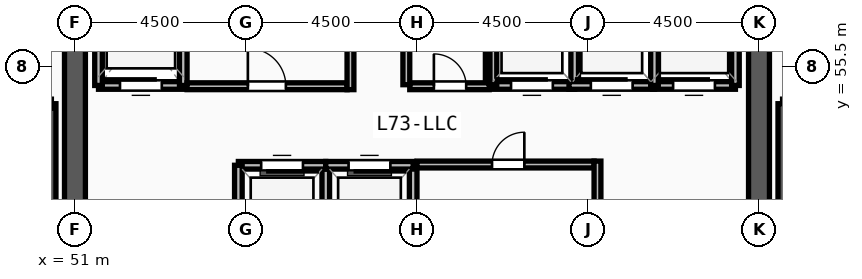
"""IFC4 building model, lengths in metres.
Left out: names, types, materials, properties, quantities, classifications, styles, units other than length and angle.
Written with IfcOpenShell. Run it as: python <this file> out.ifc"""

import sys

from ifc_helpers import new_model, si_unit, direction, frame, frame_2d, origin, place, context, subcontext, project, spatial, rectangle, extrude, source, transform, mapped, element, fill, save


model = new_model("IFC4")
c1 = context("Model", 3, precision=1e-05, world=origin(), true_north=direction((0.0, 1.0)))
c2 = subcontext(c1, "Body", "Model", "MODEL_VIEW")
j1 = project(units=[si_unit("LENGTHUNIT", "METRE"), si_unit("PLANEANGLEUNIT", "RADIAN")], contexts=[c1])
p1 = place(None, origin())
s1 = spatial("IfcSite", under=j1, at=p1, CompositionType="ELEMENT")
p2 = place(p1, origin())
s2 = spatial("IfcBuilding", under=s1, at=p2, CompositionType="ELEMENT")
p3 = place(p2, frame((0.0, 0.0, 282.0)))
s3 = spatial("IfcBuildingStorey", under=s2, at=p3, CompositionType="ELEMENT", Elevation=282.0)
p4 = place(p3, frame((69.0, 60.9, 0.0), z_axis=(0.0, 0.0, 1.0), x_axis=(0.0, -1.0, 0.0)))
e1 = element("IfcWall", 1, at=p4, inside=s3, PredefinedType="SHEAR", context=c2, shape_type="SweptSolid", body=[
    extrude(rectangle(XDim=13.8, YDim=0.55, at=frame_2d((6.9, 0.0))), origin(), (0.0, 0.0, 1.0), 4.32),
])
m1 = source(origin(), c2, "Body", "SweptSolid", [
    extrude(rectangle(XDim=1.2, YDim=2.2, at=frame_2d((0.6, 1.1))), frame((0.0, 0.285, 0.0), z_axis=(0.0, -1.0, 0.0), x_axis=(1.0, 0.0, 0.0)), (0.0, 0.0, 1.0), 0.57),
])
p5 = place(p4, frame((1.35, 0.0, 0.0)))
e2 = element("IfcOpeningElement", 2, at=p5, cuts=e1, PredefinedType="OPENING", context=c2, shape_type="MappedRepresentation", body=[
    mapped(m1, transform((0.0, 0.0, 0.0), x_axis=(1.0, 0.0, 0.0), y_axis=(0.0, 1.0, 0.0), z_axis=(0.0, 0.0, 1.0), scale=1.0)),
])
p6 = place(p3, frame((51.0, 47.1, 0.0), z_axis=(0.0, 0.0, 1.0), x_axis=(0.0, 1.0, 0.0)))
e3 = element("IfcWall", 3, at=p6, inside=s3, PredefinedType="SHEAR", context=c2, shape_type="SweptSolid", body=[
    extrude(rectangle(XDim=13.8, YDim=0.55, at=frame_2d((6.9, 0.0))), origin(), (0.0, 0.0, 1.0), 4.32),
])
m2 = source(origin(), c2, "Body", "SweptSolid", [
    extrude(rectangle(XDim=1.1, YDim=2.2, at=frame_2d((0.55, 1.1))), frame((0.0, 0.285, 0.0), z_axis=(0.0, -1.0, 0.0), x_axis=(1.0, 0.0, 0.0)), (0.0, 0.0, 1.0), 0.57),
])
p7 = place(p6, frame((11.8, 0.0, 0.0)))
e4 = element("IfcOpeningElement", 4, at=p7, cuts=e3, PredefinedType="OPENING", context=c2, shape_type="MappedRepresentation", body=[
    mapped(m2, transform((0.0, 0.0, 0.0), x_axis=(1.0, 0.0, 0.0), y_axis=(0.0, 1.0, 0.0), z_axis=(0.0, 0.0, 1.0), scale=1.0)),
])
for number, where, z_axis, x_axis in (
    (5, (50.38, 46.7, 0.0), (0.0, 0.0, 1.0), (0.0, 1.0, 0.0)),
    (6, (69.62, 54.52, 0.0), (0.0, 0.0, 1.0), (0.0, -1.0, 0.0)),
):
    element("IfcWall", number, at=place(p3, frame(where, z_axis=z_axis, x_axis=x_axis)), inside=s3, PredefinedType="SOLIDWALL", context=c2, shape_type="SweptSolid", body=[
        extrude(rectangle(XDim=7.82, YDim=0.24, at=frame_2d((3.91, 0.0))), origin(), (0.0, 0.0, 1.0), 4.32),
    ])
p8 = place(p3, frame((51.62, 55.0, 0.0), z_axis=(0.0, 0.0, 1.0), x_axis=(1.0, 0.0, 0.0)))
e7 = element("IfcWall", 7, at=p8, inside=s3, PredefinedType="SOLIDWALL", context=c2, shape_type="SweptSolid", body=[
    extrude(rectangle(XDim=2.23, YDim=0.2, at=frame_2d((1.115, 0.0))), origin(), (0.0, 0.0, 1.0), 4.32),
])
m3 = source(origin(), c2, "Body", "SweptSolid", [
    extrude(rectangle(XDim=1.1, YDim=2.2, at=frame_2d((0.55, 1.1))), frame((0.0, 0.11, 0.0), z_axis=(0.0, -1.0, 0.0), x_axis=(1.0, 0.0, 0.0)), (0.0, 0.0, 1.0), 0.22),
])
p9 = place(p8, frame((0.565, 0.0, 0.0)))
e8 = element("IfcOpeningElement", 8, at=p9, cuts=e7, PredefinedType="OPENING", context=c2, shape_type="MappedRepresentation", body=[
    mapped(m3, transform((0.0, 0.0, 0.0), x_axis=(1.0, 0.0, 0.0), y_axis=(0.0, 1.0, 0.0), z_axis=(0.0, 0.0, 1.0), scale=1.0)),
])
for number, where, z_axis, x_axis in (
    (9, (53.85, 55.0, 0.0), (0.0, 0.0, 1.0), (0.0, 1.0, 0.0)),
    (10, (51.62, 58.0, 0.0), (0.0, 0.0, 1.0), (0.0, -1.0, 0.0)),
):
    element("IfcWall", number, at=place(p3, frame(where, z_axis=z_axis, x_axis=x_axis)), inside=s3, PredefinedType="SOLIDWALL", context=c2, shape_type="SweptSolid", body=[
        extrude(rectangle(XDim=3.0, YDim=0.2, at=frame_2d((1.5, 0.0))), origin(), (0.0, 0.0, 1.0), 4.32),
    ])
p10 = place(p3, frame((66.2, 55.0, 0.0), z_axis=(0.0, 0.0, 1.0), x_axis=(1.0, 0.0, 0.0)))
e11 = element("IfcWall", 11, at=p10, inside=s3, PredefinedType="SOLIDWALL", context=c2, shape_type="SweptSolid", body=[
    extrude(rectangle(XDim=2.18, YDim=0.2, at=frame_2d((1.09, 0.0))), origin(), (0.0, 0.0, 1.0), 4.32),
])
p11 = place(p10, frame((0.54, 0.0, 0.0)))
e12 = element("IfcOpeningElement", 12, at=p11, cuts=e11, PredefinedType="OPENING", context=c2, shape_type="MappedRepresentation", body=[
    mapped(m3, transform((0.0, 0.0, 0.0), x_axis=(1.0, 0.0, 0.0), y_axis=(0.0, 1.0, 0.0), z_axis=(0.0, 0.0, 1.0), scale=1.0)),
])
p12 = place(p3, frame((68.38, 55.0, 0.0), z_axis=(0.0, 0.0, 1.0), x_axis=(0.0, 1.0, 0.0)))
e13 = element("IfcWall", 13, at=p12, inside=s3, PredefinedType="SOLIDWALL", context=c2, shape_type="SweptSolid", body=[
    extrude(rectangle(XDim=2.75, YDim=0.2, at=frame_2d((1.375, 0.0))), origin(), (0.0, 0.0, 1.0), 4.32),
])
p13 = place(p3, frame((61.9, 55.0, 0.0), z_axis=(0.0, 0.0, 1.0), x_axis=(1.0, 0.0, 0.0)))
e14 = element("IfcWall", 14, at=p13, inside=s3, PredefinedType="SOLIDWALL", context=c2, shape_type="SweptSolid", body=[
    extrude(rectangle(XDim=2.25, YDim=0.2, at=frame_2d((1.125, 0.0))), origin(), (0.0, 0.0, 1.0), 4.32),
])
p14 = place(p13, frame((0.575, 0.0, 0.0)))
e15 = element("IfcOpeningElement", 15, at=p14, cuts=e14, PredefinedType="OPENING", context=c2, shape_type="MappedRepresentation", body=[
    mapped(m3, transform((0.0, 0.0, 0.0), x_axis=(1.0, 0.0, 0.0), y_axis=(0.0, 1.0, 0.0), z_axis=(0.0, 0.0, 1.0), scale=1.0)),
])
for number, where, z_axis, x_axis in (
    (16, (64.15, 55.0, 0.0), (0.0, 0.0, 1.0), (0.0, 1.0, 0.0)),
    (17, (61.9, 57.6, 0.0), (0.0, 0.0, 1.0), (0.0, -1.0, 0.0)),
):
    element("IfcWall", number, at=place(p3, frame(where, z_axis=z_axis, x_axis=x_axis)), inside=s3, PredefinedType="SOLIDWALL", context=c2, shape_type="SweptSolid", body=[
        extrude(rectangle(XDim=2.6, YDim=0.2, at=frame_2d((1.3, 0.0))), origin(), (0.0, 0.0, 1.0), 4.32),
    ])
p15 = place(p3, frame((64.0, 55.0, 0.0), z_axis=(0.0, 0.0, 1.0), x_axis=(1.0, 0.0, 0.0)))
e18 = element("IfcWall", 18, at=p15, inside=s3, PredefinedType="SOLIDWALL", context=c2, shape_type="SweptSolid", body=[
    extrude(rectangle(XDim=2.25, YDim=0.2, at=frame_2d((1.125, 0.0))), origin(), (0.0, 0.0, 1.0), 4.32),
])
p16 = place(p15, frame((0.575, 0.0, 0.0)))
e19 = element("IfcOpeningElement", 19, at=p16, cuts=e18, PredefinedType="OPENING", context=c2, shape_type="MappedRepresentation", body=[
    mapped(m3, transform((0.0, 0.0, 0.0), x_axis=(1.0, 0.0, 0.0), y_axis=(0.0, 1.0, 0.0), z_axis=(0.0, 0.0, 1.0), scale=1.0)),
])
p17 = place(p3, frame((66.25, 55.0, 0.0), z_axis=(0.0, 0.0, 1.0), x_axis=(0.0, 1.0, 0.0)))
e20 = element("IfcWall", 20, at=p17, inside=s3, PredefinedType="SOLIDWALL", context=c2, shape_type="SweptSolid", body=[
    extrude(rectangle(XDim=2.6, YDim=0.2, at=frame_2d((1.3, 0.0))), origin(), (0.0, 0.0, 1.0), 4.32),
])
p18 = place(p3, frame((57.6, 50.3, 0.0), z_axis=(0.0, 0.0, 1.0), x_axis=(0.0, 1.0, 0.0)))
e21 = element("IfcWall", 21, at=p18, inside=s3, PredefinedType="SOLIDWALL", context=c2, shape_type="SweptSolid", body=[
    extrude(rectangle(XDim=2.6, YDim=0.2, at=frame_2d((1.3, 0.0))), origin(), (0.0, 0.0, 1.0), 4.32),
])
p19 = place(p3, frame((57.6, 52.9, 0.0), z_axis=(0.0, 0.0, 1.0), x_axis=(-1.0, 0.0, 0.0)))
e22 = element("IfcWall", 22, at=p19, inside=s3, PredefinedType="SOLIDWALL", context=c2, shape_type="SweptSolid", body=[
    extrude(rectangle(XDim=2.3, YDim=0.2, at=frame_2d((1.15, 0.0))), origin(), (0.0, 0.0, 1.0), 4.32),
])
p20 = place(p19, frame((0.6, 0.0, 0.0)))
e23 = element("IfcOpeningElement", 23, at=p20, cuts=e22, PredefinedType="OPENING", context=c2, shape_type="MappedRepresentation", body=[
    mapped(m3, transform((0.0, 0.0, 0.0), x_axis=(1.0, 0.0, 0.0), y_axis=(0.0, 1.0, 0.0), z_axis=(0.0, 0.0, 1.0), scale=1.0)),
])
for number, where, z_axis, x_axis in (
    (24, (55.3, 52.9, 0.0), (0.0, 0.0, 1.0), (0.0, -1.0, 0.0)),
    (25, (59.9, 50.3, 0.0), (0.0, 0.0, 1.0), (0.0, 1.0, 0.0)),
):
    element("IfcWall", number, at=place(p3, frame(where, z_axis=z_axis, x_axis=x_axis)), inside=s3, PredefinedType="SOLIDWALL", context=c2, shape_type="SweptSolid", body=[
        extrude(rectangle(XDim=2.6, YDim=0.2, at=frame_2d((1.3, 0.0))), origin(), (0.0, 0.0, 1.0), 4.32),
    ])
p21 = place(p3, frame((59.9, 52.9, 0.0), z_axis=(0.0, 0.0, 1.0), x_axis=(-1.0, 0.0, 0.0)))
e26 = element("IfcWall", 26, at=p21, inside=s3, PredefinedType="SOLIDWALL", context=c2, shape_type="SweptSolid", body=[
    extrude(rectangle(XDim=2.3, YDim=0.2, at=frame_2d((1.15, 0.0))), origin(), (0.0, 0.0, 1.0), 4.32),
])
p22 = place(p21, frame((0.6, 0.0, 0.0)))
e27 = element("IfcOpeningElement", 27, at=p22, cuts=e26, PredefinedType="OPENING", context=c2, shape_type="MappedRepresentation", body=[
    mapped(m3, transform((0.0, 0.0, 0.0), x_axis=(1.0, 0.0, 0.0), y_axis=(0.0, 1.0, 0.0), z_axis=(0.0, 0.0, 1.0), scale=1.0)),
])
p23 = place(p3, frame((53.95, 54.98, 0.0), z_axis=(0.0, 0.0, 1.0), x_axis=(1.0, 0.0, 0.0)))
e28 = element("IfcWall", 28, at=p23, inside=s3, PredefinedType="PARTITIONING", context=c2, shape_type="SweptSolid", body=[
    extrude(rectangle(XDim=4.21, YDim=0.18, at=frame_2d((2.105, 0.0))), origin(), (0.0, 0.0, 1.0), 4.32),
])
m4 = source(origin(), c2, "Body", "SweptSolid", [
    extrude(rectangle(XDim=1.0, YDim=2.2, at=frame_2d((0.5, 1.1))), frame((0.0, 0.1, 0.0), z_axis=(0.0, -1.0, 0.0), x_axis=(1.0, 0.0, 0.0)), (0.0, 0.0, 1.0), 0.2),
])
p24 = place(p23, frame((1.6, 0.0, 0.0)))
e29 = element("IfcOpeningElement", 29, at=p24, cuts=e28, PredefinedType="OPENING", context=c2, shape_type="MappedRepresentation", body=[
    mapped(m4, transform((0.0, 0.0, 0.0), x_axis=(1.0, 0.0, 0.0), y_axis=(0.0, 1.0, 0.0), z_axis=(0.0, 0.0, 1.0), scale=1.0)),
])
p25 = place(p3, frame((60.0, 52.92, 0.0), z_axis=(0.0, 0.0, 1.0), x_axis=(1.0, 0.0, 0.0)))
e30 = element("IfcWall", 30, at=p25, inside=s3, PredefinedType="PARTITIONING", context=c2, shape_type="SweptSolid", body=[
    extrude(rectangle(XDim=4.66, YDim=0.18, at=frame_2d((2.33, 0.0))), origin(), (0.0, 0.0, 1.0), 4.32),
])
m5 = source(origin(), c2, "Body", "SweptSolid", [
    extrude(rectangle(XDim=0.85, YDim=2.1, at=frame_2d((0.425, 1.05))), frame((0.0, 0.1, 0.0), z_axis=(0.0, -1.0, 0.0), x_axis=(1.0, 0.0, 0.0)), (0.0, 0.0, 1.0), 0.2),
])
p26 = place(p25, frame((1.975, 0.0, 0.0)))
e31 = element("IfcOpeningElement", 31, at=p26, cuts=e30, PredefinedType="OPENING", context=c2, shape_type="MappedRepresentation", body=[
    mapped(m5, transform((0.0, 0.0, 0.0), x_axis=(1.0, 0.0, 0.0), y_axis=(0.0, 1.0, 0.0), z_axis=(0.0, 0.0, 1.0), scale=1.0)),
])
p27 = place(p3, frame((59.81, 54.98, 0.0), z_axis=(0.0, 0.0, 1.0), x_axis=(1.0, 0.0, 0.0)))
e32 = element("IfcWall", 32, at=p27, inside=s3, PredefinedType="PARTITIONING", context=c2, shape_type="SweptSolid", body=[
    extrude(rectangle(XDim=2.09, YDim=0.18, at=frame_2d((1.045, 0.0))), origin(), (0.0, 0.0, 1.0), 4.32),
])
p28 = place(p27, frame((0.635, 0.0, 0.0)))
e33 = element("IfcOpeningElement", 33, at=p28, cuts=e32, PredefinedType="OPENING", context=c2, shape_type="MappedRepresentation", body=[
    mapped(m5, transform((0.0, 0.0, 0.0), x_axis=(1.0, 0.0, 0.0), y_axis=(0.0, 1.0, 0.0), z_axis=(0.0, 0.0, 1.0), scale=1.0)),
])
for number, where, z_axis, x_axis in (
    (34, (59.72, 55.02, 0.0), (0.0, 0.0, 1.0), (0.0, 1.0, 0.0)),
    (35, (62.01, 55.02, 0.0), (0.0, 0.0, 1.0), (0.0, 1.0, 0.0)),
):
    element("IfcWall", number, at=place(p3, frame(where, z_axis=z_axis, x_axis=x_axis)), inside=s3, PredefinedType="PARTITIONING", context=c2, shape_type="SweptSolid", body=[
        extrude(rectangle(XDim=2.88, YDim=0.18, at=frame_2d((1.44, 0.0))), origin(), (0.0, 0.0, 1.0), 4.32),
    ])
p29 = place(p3, frame((58.25, 54.89, 0.0), z_axis=(0.0, 0.0, 1.0), x_axis=(0.0, 1.0, 0.0)))
e36 = element("IfcWall", 36, at=p29, inside=s3, PredefinedType="PARTITIONING", context=c2, shape_type="SweptSolid", body=[
    extrude(rectangle(XDim=3.02, YDim=0.18, at=frame_2d((1.51, 0.0))), origin(), (0.0, 0.0, 1.0), 4.32),
])
p30 = place(p3, frame((64.75, 50.22, 0.0), z_axis=(0.0, 0.0, 1.0), x_axis=(0.0, 1.0, 0.0)))
e37 = element("IfcWall", 37, at=p30, inside=s3, PredefinedType="PARTITIONING", context=c2, shape_type="SweptSolid", body=[
    extrude(rectangle(XDim=2.79, YDim=0.18, at=frame_2d((1.395, 0.0))), origin(), (0.0, 0.0, 1.0), 4.32),
])
m6 = source(origin(), c2, "Body", "SweptSolid", [
    extrude(rectangle(XDim=1.1, YDim=2.2, at=frame_2d((0.55, 1.1))), frame((0.0, 0.025, 0.0), z_axis=(0.0, -1.0, 0.0), x_axis=(1.0, 0.0, 0.0)), (0.0, 0.0, 1.0), 0.05),
])
p31 = place(p9, origin())
e38 = element("IfcDoor", 38, at=p31, inside=s3, OperationType="SLIDING_TO_LEFT", PredefinedType="DOOR", context=c2, shape_type="MappedRepresentation", body=[
    mapped(m6, transform((0.0, 0.0, 0.0), x_axis=(1.0, 0.0, 0.0), y_axis=(0.0, 1.0, 0.0), z_axis=(0.0, 0.0, 1.0), scale=1.0)),
])
fill(e8, e38)
p32 = place(p11, origin())
e39 = element("IfcDoor", 39, at=p32, inside=s3, OperationType="SLIDING_TO_LEFT", PredefinedType="DOOR", context=c2, shape_type="MappedRepresentation", body=[
    mapped(m6, transform((0.0, 0.0, 0.0), x_axis=(1.0, 0.0, 0.0), y_axis=(0.0, 1.0, 0.0), z_axis=(0.0, 0.0, 1.0), scale=1.0)),
])
fill(e12, e39)
p33 = place(p14, origin())
e40 = element("IfcDoor", 40, at=p33, inside=s3, OperationType="SLIDING_TO_LEFT", PredefinedType="DOOR", context=c2, shape_type="MappedRepresentation", body=[
    mapped(m6, transform((0.0, 0.0, 0.0), x_axis=(1.0, 0.0, 0.0), y_axis=(0.0, 1.0, 0.0), z_axis=(0.0, 0.0, 1.0), scale=1.0)),
])
fill(e15, e40)
p34 = place(p16, origin())
e41 = element("IfcDoor", 41, at=p34, inside=s3, OperationType="SLIDING_TO_LEFT", PredefinedType="DOOR", context=c2, shape_type="MappedRepresentation", body=[
    mapped(m6, transform((0.0, 0.0, 0.0), x_axis=(1.0, 0.0, 0.0), y_axis=(0.0, 1.0, 0.0), z_axis=(0.0, 0.0, 1.0), scale=1.0)),
])
fill(e19, e41)
p35 = place(p20, origin())
e42 = element("IfcDoor", 42, at=p35, inside=s3, OperationType="SLIDING_TO_LEFT", PredefinedType="DOOR", context=c2, shape_type="MappedRepresentation", body=[
    mapped(m6, transform((0.0, 0.0, 0.0), x_axis=(1.0, 0.0, 0.0), y_axis=(0.0, 1.0, 0.0), z_axis=(0.0, 0.0, 1.0), scale=1.0)),
])
fill(e23, e42)
p36 = place(p22, origin())
e43 = element("IfcDoor", 43, at=p36, inside=s3, OperationType="SLIDING_TO_LEFT", PredefinedType="DOOR", context=c2, shape_type="MappedRepresentation", body=[
    mapped(m6, transform((0.0, 0.0, 0.0), x_axis=(1.0, 0.0, 0.0), y_axis=(0.0, 1.0, 0.0), z_axis=(0.0, 0.0, 1.0), scale=1.0)),
])
fill(e27, e43)
m7 = source(origin(), c2, "Body", "SweptSolid", [
    extrude(rectangle(XDim=1.0, YDim=2.2, at=frame_2d((0.5, 1.1))), frame((0.0, 0.025, 0.0), z_axis=(0.0, -1.0, 0.0), x_axis=(1.0, 0.0, 0.0)), (0.0, 0.0, 1.0), 0.05),
])
p37 = place(p24, origin())
e44 = element("IfcDoor", 44, at=p37, inside=s3, OperationType="SINGLE_SWING_LEFT", PredefinedType="DOOR", context=c2, shape_type="MappedRepresentation", body=[
    mapped(m7, transform((0.0, 0.0, 0.0), x_axis=(1.0, 0.0, 0.0), y_axis=(0.0, 1.0, 0.0), z_axis=(0.0, 0.0, 1.0), scale=1.0)),
])
fill(e29, e44)
m8 = source(origin(), c2, "Body", "SweptSolid", [
    extrude(rectangle(XDim=0.85, YDim=2.1, at=frame_2d((0.425, 1.05))), frame((0.0, 0.025, 0.0), z_axis=(0.0, -1.0, 0.0), x_axis=(1.0, 0.0, 0.0)), (0.0, 0.0, 1.0), 0.05),
])
p38 = place(p26, origin())
e45 = element("IfcDoor", 45, at=p38, inside=s3, OperationType="SINGLE_SWING_RIGHT", PredefinedType="DOOR", context=c2, shape_type="MappedRepresentation", body=[
    mapped(m8, transform((0.0, 0.0, 0.0), x_axis=(1.0, 0.0, 0.0), y_axis=(0.0, 1.0, 0.0), z_axis=(0.0, 0.0, 1.0), scale=1.0)),
])
fill(e31, e45)
p39 = place(p28, origin())
e46 = element("IfcDoor", 46, at=p39, inside=s3, OperationType="SINGLE_SWING_LEFT", PredefinedType="DOOR", context=c2, shape_type="MappedRepresentation", body=[
    mapped(m8, transform((0.0, 0.0, 0.0), x_axis=(1.0, 0.0, 0.0), y_axis=(0.0, 1.0, 0.0), z_axis=(0.0, 0.0, 1.0), scale=1.0)),
])
fill(e33, e46)
save(model, sys.argv[1])
